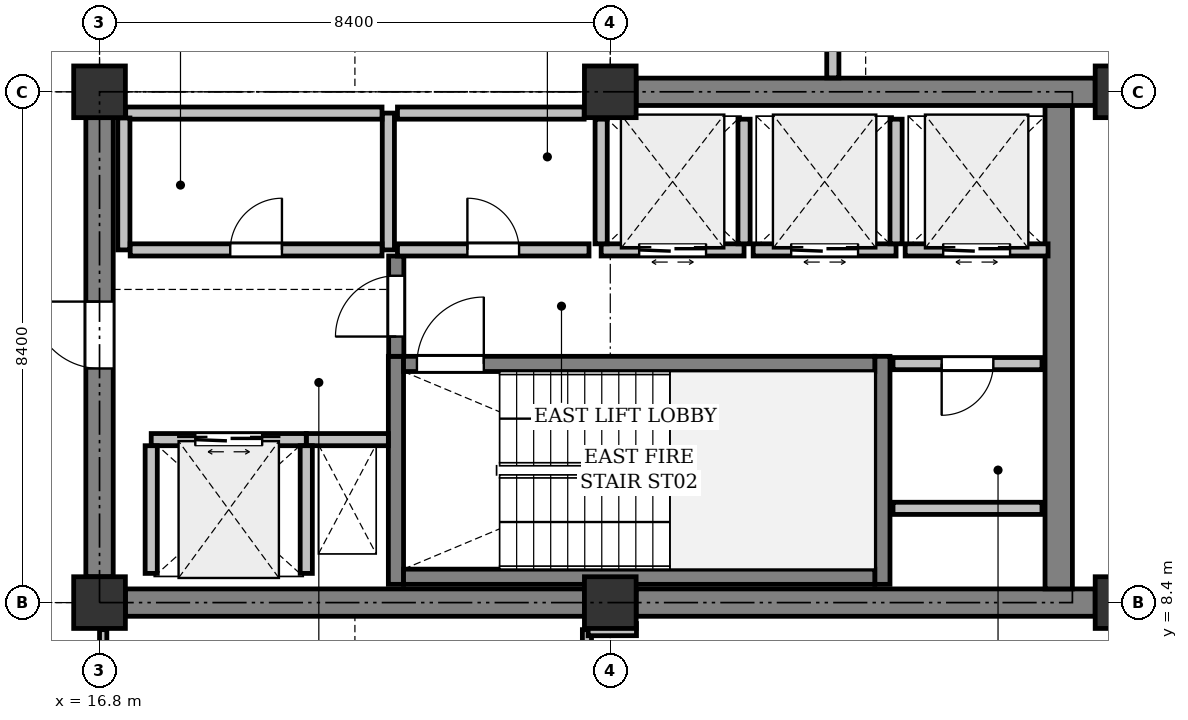
"""IFC4 building model, lengths in metres.
Left out: names, types, materials, properties, quantities, classifications, styles, units other than length and angle.
Written with IfcOpenShell. Run it as: python <this file> out.ifc"""

import sys

from ifc_helpers import new_model, si_unit, direction, frame, frame_2d, origin, origin_2d, place, context, subcontext, project, spatial, rectangle, extrude, element, fill, save


model = new_model("IFC4")
c1 = context("Model", 3, precision=1e-05, world=origin(), true_north=direction((0.0, 1.0)))
c2 = subcontext(c1, "Body", "Model", "MODEL_VIEW")
j1 = project(units=[si_unit("LENGTHUNIT", "METRE"), si_unit("PLANEANGLEUNIT", "RADIAN")], contexts=[c1])
p1 = place(None, origin())
s1 = spatial("IfcSite", under=j1, at=p1, CompositionType="ELEMENT")
p2 = place(p1, origin())
s2 = spatial("IfcBuilding", under=s1, at=p2, CompositionType="ELEMENT")
p3 = place(p2, frame((0.0, 0.0, 314.2)))
s3 = spatial("IfcBuildingStorey", under=s2, at=p3, CompositionType="ELEMENT", Elevation=314.2)
for number, where, z_axis, x_axis in (
    (1, (16.8, 8.4, 0.0), (0.0, 0.0, 1.0), (1.0, 0.0, 0.0)),
    (2, (16.8, 16.8, 0.0), (0.0, 0.0, 1.0), (1.0, 0.0, 0.0)),
    (3, (25.2, 8.4, 0.0), (0.0, 0.0, 1.0), (1.0, 0.0, 0.0)),
    (4, (25.2, 16.8, 0.0), (0.0, 0.0, 1.0), (1.0, 0.0, 0.0)),
    (5, (33.6, 8.4, 0.0), (0.0, 0.0, 1.0), (1.0, 0.0, 0.0)),
    (6, (33.6, 16.8, 0.0), (0.0, 0.0, 1.0), (1.0, 0.0, 0.0)),
):
    element("IfcColumn", number, at=place(p3, frame(where, z_axis=z_axis, x_axis=x_axis)), inside=s3, PredefinedType="COLUMN", context=c2, shape_type="SweptSolid", body=[
        extrude(rectangle(XDim=0.85, YDim=0.85, at=origin_2d()), origin(), (0.0, 0.0, 1.0), 4.0),
    ])
p4 = place(p3, frame((17.225, 8.4, 0.0), z_axis=(0.0, 0.0, 1.0), x_axis=(1.0, 0.0, 0.0)))
e7 = element("IfcWall", 7, at=p4, inside=s3, PredefinedType="SHEAR", context=c2, shape_type="SweptSolid", body=[
    extrude(rectangle(XDim=7.55, YDim=0.45, at=frame_2d((3.775, 0.0))), origin(), (0.0, 0.0, 1.0), 3.725),
])
p5 = place(p3, frame((25.625, 8.4, 0.0), z_axis=(0.0, 0.0, 1.0), x_axis=(1.0, 0.0, 0.0)))
e8 = element("IfcWall", 8, at=p5, inside=s3, PredefinedType="SHEAR", context=c2, shape_type="SweptSolid", body=[
    extrude(rectangle(XDim=7.55, YDim=0.45, at=frame_2d((3.775, 0.0))), origin(), (0.0, 0.0, 1.0), 3.725),
])
p6 = place(p3, frame((32.575, 8.625, 0.0), z_axis=(0.0, 0.0, 1.0), x_axis=(0.0, 1.0, 0.0)))
e9 = element("IfcWall", 9, at=p6, inside=s3, PredefinedType="SHEAR", context=c2, shape_type="SweptSolid", body=[
    extrude(rectangle(XDim=7.95, YDim=0.45, at=frame_2d((3.975, 0.0))), origin(), (0.0, 0.0, 1.0), 3.725),
])
p7 = place(p3, frame((16.8, 8.825, 0.0), z_axis=(0.0, 0.0, 1.0), x_axis=(0.0, 1.0, 0.0)))
e10 = element("IfcWall", 10, at=p7, inside=s3, PredefinedType="SHEAR", context=c2, shape_type="SweptSolid", body=[
    extrude(rectangle(XDim=7.55, YDim=0.45, at=frame_2d((3.775, 0.0))), origin(), (0.0, 0.0, 1.0), 3.725),
])
p8 = place(p7, frame((3.425, 0.0, 0.0)))
e11 = element("IfcOpeningElement", 11, at=p8, cuts=e10, PredefinedType="OPENING", context=c2, shape_type="SweptSolid", body=[
    extrude(rectangle(XDim=1.1, YDim=2.15, at=frame_2d((0.55, 1.075))), frame((0.0, 0.235, 0.0), z_axis=(0.0, -1.0, 0.0), x_axis=(1.0, 0.0, 0.0)), (0.0, 0.0, 1.0), 0.47),
])
p9 = place(p3, frame((25.625, 16.8, 0.0), z_axis=(0.0, 0.0, 1.0), x_axis=(1.0, 0.0, 0.0)))
e12 = element("IfcWall", 12, at=p9, inside=s3, PredefinedType="SHEAR", context=c2, shape_type="SweptSolid", body=[
    extrude(rectangle(XDim=7.55, YDim=0.45, at=frame_2d((3.775, 0.0))), origin(), (0.0, 0.0, 1.0), 3.725),
])
for number, where, z_axis, x_axis in (
    (13, (21.675, 8.7, 0.0), (0.0, 0.0, 1.0), (0.0, 1.0, 0.0)),
    (14, (29.675, 8.7, 0.0), (0.0, 0.0, 1.0), (0.0, 1.0, 0.0)),
):
    element("IfcWall", number, at=place(p3, frame(where, z_axis=z_axis, x_axis=x_axis)), inside=s3, PredefinedType="SHEAR", context=c2, shape_type="SweptSolid", body=[
        extrude(rectangle(XDim=3.75, YDim=0.25, at=frame_2d((1.875, 0.0))), origin(), (0.0, 0.0, 1.0), 3.725),
    ])
p10 = place(p3, frame((21.8, 8.825, 0.0), z_axis=(0.0, 0.0, 1.0), x_axis=(1.0, 0.0, 0.0)))
e15 = element("IfcWall", 15, at=p10, inside=s3, PredefinedType="SHEAR", context=c2, shape_type="SweptSolid", body=[
    extrude(rectangle(XDim=7.75, YDim=0.25, at=frame_2d((3.875, 0.0))), origin(), (0.0, 0.0, 1.0), 3.725),
])
p11 = place(p3, frame((21.8, 12.325, 0.0), z_axis=(0.0, 0.0, 1.0), x_axis=(1.0, 0.0, 0.0)))
e16 = element("IfcWall", 16, at=p11, inside=s3, PredefinedType="SHEAR", context=c2, shape_type="SweptSolid", body=[
    extrude(rectangle(XDim=7.75, YDim=0.25, at=frame_2d((3.875, 0.0))), origin(), (0.0, 0.0, 1.0), 3.725),
])
p12 = place(p11, frame((0.22, 0.0, 0.0)))
e17 = element("IfcOpeningElement", 17, at=p12, cuts=e16, PredefinedType="OPENING", context=c2, shape_type="SweptSolid", body=[
    extrude(rectangle(XDim=1.1, YDim=2.15, at=frame_2d((0.55, 1.075))), frame((0.0, 0.135, 0.0), z_axis=(0.0, -1.0, 0.0), x_axis=(1.0, 0.0, 0.0)), (0.0, 0.0, 1.0), 0.27),
])
p13 = place(p3, frame((20.2, 11.08, 0.0), z_axis=(0.0, 0.0, 1.0), x_axis=(1.0, 0.0, 0.0)))
e18 = element("IfcWall", 18, at=p13, inside=s3, PredefinedType="PARTITIONING", context=c2, shape_type="SweptSolid", body=[
    extrude(rectangle(XDim=1.35, YDim=0.2, at=frame_2d((0.675, 0.0))), origin(), (0.0, 0.0, 1.0), 3.725),
])
p14 = place(p3, frame((21.68, 12.45, 0.0), z_axis=(0.0, 0.0, 1.0), x_axis=(0.0, 1.0, 0.0)))
e19 = element("IfcWall", 19, at=p14, inside=s3, PredefinedType="SHEAR", context=c2, shape_type="SweptSolid", body=[
    extrude(rectangle(XDim=1.65, YDim=0.25, at=frame_2d((0.825, 0.0))), origin(), (0.0, 0.0, 1.0), 3.725),
])
p15 = place(p14, frame((0.325, 0.0, 0.0)))
e20 = element("IfcOpeningElement", 20, at=p15, cuts=e19, PredefinedType="OPENING", context=c2, shape_type="SweptSolid", body=[
    extrude(rectangle(XDim=1.0, YDim=2.15, at=frame_2d((0.5, 1.075))), frame((0.0, 0.135, 0.0), z_axis=(0.0, -1.0, 0.0), x_axis=(1.0, 0.0, 0.0)), (0.0, 0.0, 1.0), 0.27),
])
p16 = place(p3, frame((17.65, 11.08, 0.0), z_axis=(0.0, 0.0, 1.0), x_axis=(1.0, 0.0, 0.0)))
e21 = element("IfcWall", 21, at=p16, inside=s3, PredefinedType="PARTITIONING", context=c2, shape_type="SweptSolid", body=[
    extrude(rectangle(XDim=2.55, YDim=0.2, at=frame_2d((1.275, 0.0))), origin(), (0.0, 0.0, 1.0), 3.725),
])
p17 = place(p16, frame((0.725, 0.0, 0.0)))
e22 = element("IfcOpeningElement", 22, at=p17, cuts=e21, PredefinedType="OPENING", context=c2, shape_type="SweptSolid", body=[
    extrude(rectangle(XDim=1.1, YDim=2.2, at=frame_2d((0.55, 1.1))), frame((0.0, 0.11, 0.0), z_axis=(0.0, -1.0, 0.0), x_axis=(1.0, 0.0, 0.0)), (0.0, 0.0, 1.0), 0.22),
])
for number, where, z_axis, x_axis in (
    (23, (20.2, 8.88, 0.0), (0.0, 0.0, 1.0), (0.0, 1.0, 0.0)),
    (24, (17.65, 8.88, 0.0), (0.0, 0.0, 1.0), (0.0, 1.0, 0.0)),
):
    element("IfcWall", number, at=place(p3, frame(where, z_axis=z_axis, x_axis=x_axis)), inside=s3, PredefinedType="PARTITIONING", context=c2, shape_type="SweptSolid", body=[
        extrude(rectangle(XDim=2.1, YDim=0.2, at=frame_2d((1.05, 0.0))), origin(), (0.0, 0.0, 1.0), 3.725),
    ])
p18 = place(p3, frame((25.05, 14.2, 0.0), z_axis=(0.0, 0.0, 1.0), x_axis=(1.0, 0.0, 0.0)))
e25 = element("IfcWall", 25, at=p18, inside=s3, PredefinedType="PARTITIONING", context=c2, shape_type="SweptSolid", body=[
    extrude(rectangle(XDim=2.35, YDim=0.2, at=frame_2d((1.175, 0.0))), origin(), (0.0, 0.0, 1.0), 3.725),
])
p19 = place(p18, frame((0.625, 0.0, 0.0)))
e26 = element("IfcOpeningElement", 26, at=p19, cuts=e25, PredefinedType="OPENING", context=c2, shape_type="SweptSolid", body=[
    extrude(rectangle(XDim=1.1, YDim=2.2, at=frame_2d((0.55, 1.1))), frame((0.0, 0.11, 0.0), z_axis=(0.0, -1.0, 0.0), x_axis=(1.0, 0.0, 0.0)), (0.0, 0.0, 1.0), 0.22),
])
for number, where, z_axis, x_axis in (
    (27, (27.4, 14.3, 0.0), (0.0, 0.0, 1.0), (0.0, 1.0, 0.0)),
    (28, (25.05, 14.3, 0.0), (0.0, 0.0, 1.0), (0.0, 1.0, 0.0)),
):
    element("IfcWall", number, at=place(p3, frame(where, z_axis=z_axis, x_axis=x_axis)), inside=s3, PredefinedType="PARTITIONING", context=c2, shape_type="SweptSolid", body=[
        extrude(rectangle(XDim=2.05, YDim=0.2, at=frame_2d((1.025, 0.0))), origin(), (0.0, 0.0, 1.0), 3.725),
    ])
p20 = place(p3, frame((27.55, 14.2, 0.0), z_axis=(0.0, 0.0, 1.0), x_axis=(1.0, 0.0, 0.0)))
e29 = element("IfcWall", 29, at=p20, inside=s3, PredefinedType="PARTITIONING", context=c2, shape_type="SweptSolid", body=[
    extrude(rectangle(XDim=2.35, YDim=0.2, at=frame_2d((1.175, 0.0))), origin(), (0.0, 0.0, 1.0), 3.725),
])
p21 = place(p20, frame((0.625, 0.0, 0.0)))
e30 = element("IfcOpeningElement", 30, at=p21, cuts=e29, PredefinedType="OPENING", context=c2, shape_type="SweptSolid", body=[
    extrude(rectangle(XDim=1.1, YDim=2.2, at=frame_2d((0.55, 1.1))), frame((0.0, 0.11, 0.0), z_axis=(0.0, -1.0, 0.0), x_axis=(1.0, 0.0, 0.0)), (0.0, 0.0, 1.0), 0.22),
])
p22 = place(p3, frame((29.9, 14.3, 0.0), z_axis=(0.0, 0.0, 1.0), x_axis=(0.0, 1.0, 0.0)))
e31 = element("IfcWall", 31, at=p22, inside=s3, PredefinedType="PARTITIONING", context=c2, shape_type="SweptSolid", body=[
    extrude(rectangle(XDim=2.05, YDim=0.2, at=frame_2d((1.025, 0.0))), origin(), (0.0, 0.0, 1.0), 3.725),
])
p23 = place(p3, frame((30.05, 14.2, 0.0), z_axis=(0.0, 0.0, 1.0), x_axis=(1.0, 0.0, 0.0)))
e32 = element("IfcWall", 32, at=p23, inside=s3, PredefinedType="PARTITIONING", context=c2, shape_type="SweptSolid", body=[
    extrude(rectangle(XDim=2.35, YDim=0.2, at=frame_2d((1.175, 0.0))), origin(), (0.0, 0.0, 1.0), 3.725),
])
p24 = place(p23, frame((0.625, 0.0, 0.0)))
e33 = element("IfcOpeningElement", 33, at=p24, cuts=e32, PredefinedType="OPENING", context=c2, shape_type="SweptSolid", body=[
    extrude(rectangle(XDim=1.1, YDim=2.2, at=frame_2d((0.55, 1.1))), frame((0.0, 0.11, 0.0), z_axis=(0.0, -1.0, 0.0), x_axis=(1.0, 0.0, 0.0)), (0.0, 0.0, 1.0), 0.22),
])
p25 = place(p3, frame((21.55, 14.2, 0.0), z_axis=(0.0, 0.0, 1.0), x_axis=(0.0, 1.0, 0.0)))
e34 = element("IfcWall", 34, at=p25, inside=s3, PredefinedType="PARTITIONING", context=c2, shape_type="SweptSolid", body=[
    extrude(rectangle(XDim=2.25, YDim=0.2, at=frame_2d((1.125, 0.0))), origin(), (0.0, 0.0, 1.0), 3.725),
])
p26 = place(p3, frame((21.446, 16.45, 0.0), z_axis=(0.0, 0.0, 1.0), x_axis=(-1.0, 0.0, 0.0)))
e35 = element("IfcWall", 35, at=p26, inside=s3, PredefinedType="PARTITIONING", context=c2, shape_type="SweptSolid", body=[
    extrude(rectangle(XDim=4.216, YDim=0.2, at=frame_2d((2.108, 0.0))), origin(), (0.0, 0.0, 1.0), 3.725),
])
p27 = place(p3, frame((17.2, 16.37, 0.0), z_axis=(0.0, 0.0, 1.0), x_axis=(0.0, -1.0, 0.0)))
e36 = element("IfcWall", 36, at=p27, inside=s3, PredefinedType="PARTITIONING", context=c2, shape_type="SweptSolid", body=[
    extrude(rectangle(XDim=2.17, YDim=0.2, at=frame_2d((1.085, 0.0))), origin(), (0.0, 0.0, 1.0), 3.725),
])
p28 = place(p3, frame((17.304, 14.2, 0.0), z_axis=(0.0, 0.0, 1.0), x_axis=(1.0, 0.0, 0.0)))
e37 = element("IfcWall", 37, at=p28, inside=s3, PredefinedType="PARTITIONING", context=c2, shape_type="SweptSolid", body=[
    extrude(rectangle(XDim=4.142, YDim=0.2, at=frame_2d((2.071, 0.0))), origin(), (0.0, 0.0, 1.0), 3.725),
])
p29 = place(p28, frame((1.646, 0.0, 0.0)))
e38 = element("IfcOpeningElement", 38, at=p29, cuts=e37, PredefinedType="OPENING", context=c2, shape_type="SweptSolid", body=[
    extrude(rectangle(XDim=0.85, YDim=2.15, at=frame_2d((0.425, 1.075))), frame((0.0, 0.11, 0.0), z_axis=(0.0, -1.0, 0.0), x_axis=(1.0, 0.0, 0.0)), (0.0, 0.0, 1.0), 0.22),
])
p30 = place(p3, frame((24.77, 16.45, 0.0), z_axis=(0.0, 0.0, 1.0), x_axis=(-1.0, 0.0, 0.0)))
e39 = element("IfcWall", 39, at=p30, inside=s3, PredefinedType="PARTITIONING", context=c2, shape_type="SweptSolid", body=[
    extrude(rectangle(XDim=3.07, YDim=0.2, at=frame_2d((1.535, 0.0))), origin(), (0.0, 0.0, 1.0), 3.725),
])
p31 = place(p3, frame((21.7, 14.2, 0.0), z_axis=(0.0, 0.0, 1.0), x_axis=(1.0, 0.0, 0.0)))
e40 = element("IfcWall", 40, at=p31, inside=s3, PredefinedType="PARTITIONING", context=c2, shape_type="SweptSolid", body=[
    extrude(rectangle(XDim=3.15, YDim=0.2, at=frame_2d((1.575, 0.0))), origin(), (0.0, 0.0, 1.0), 3.725),
])
p32 = place(p31, frame((1.15, 0.0, 0.0)))
e41 = element("IfcOpeningElement", 41, at=p32, cuts=e40, PredefinedType="OPENING", context=c2, shape_type="SweptSolid", body=[
    extrude(rectangle(XDim=0.85, YDim=2.15, at=frame_2d((0.425, 1.075))), frame((0.0, 0.11, 0.0), z_axis=(0.0, -1.0, 0.0), x_axis=(1.0, 0.0, 0.0)), (0.0, 0.0, 1.0), 0.22),
])
p33 = place(p3, frame((32.3, 12.33, 0.0), z_axis=(0.0, 0.0, 1.0), x_axis=(-1.0, 0.0, 0.0)))
e42 = element("IfcWall", 42, at=p33, inside=s3, PredefinedType="PARTITIONING", context=c2, shape_type="SweptSolid", body=[
    extrude(rectangle(XDim=2.45, YDim=0.2, at=frame_2d((1.225, 0.0))), origin(), (0.0, 0.0, 1.0), 3.725),
])
p34 = place(p33, frame((0.8, 0.0, 0.0)))
e43 = element("IfcOpeningElement", 43, at=p34, cuts=e42, PredefinedType="OPENING", context=c2, shape_type="SweptSolid", body=[
    extrude(rectangle(XDim=0.85, YDim=2.15, at=frame_2d((0.425, 1.075))), frame((0.0, 0.11, 0.0), z_axis=(0.0, -1.0, 0.0), x_axis=(1.0, 0.0, 0.0)), (0.0, 0.0, 1.0), 0.22),
])
p35 = place(p3, frame((29.85, 9.95, 0.0), z_axis=(0.0, 0.0, 1.0), x_axis=(1.0, 0.0, 0.0)))
e44 = element("IfcWall", 44, at=p35, inside=s3, PredefinedType="PARTITIONING", context=c2, shape_type="SweptSolid", body=[
    extrude(rectangle(XDim=2.45, YDim=0.2, at=frame_2d((1.225, 0.0))), origin(), (0.0, 0.0, 1.0), 3.725),
])
p36 = place(p3, frame((24.816, 0.124, 0.0), z_axis=(0.0, 0.0, 1.0), x_axis=(0.0, 1.0, 0.0)))
e45 = element("IfcWall", 45, at=p36, inside=s3, PredefinedType="PARTITIONING", context=c2, shape_type="SweptSolid", body=[
    extrude(rectangle(XDim=7.831, YDim=0.15, at=frame_2d((3.916, 0.0))), origin(), (0.0, 0.0, 1.0), 3.725),
])
p37 = place(p3, frame((16.86, 7.955, 0.0), z_axis=(0.0, 0.0, 1.0), x_axis=(0.0, -1.0, 0.0)))
e46 = element("IfcWall", 46, at=p37, inside=s3, PredefinedType="PARTITIONING", context=c2, shape_type="SweptSolid", body=[
    extrude(rectangle(XDim=2.555, YDim=0.12, at=frame_2d((1.278, 0.0))), origin(), (0.0, 0.0, 1.0), 3.319),
])
p38 = place(p3, frame((25.631, 7.956, 0.0), z_axis=(0.0, 0.0, 1.0), x_axis=(-0.999999575533, -0.00092137553, 0.0)))
e47 = element("IfcWall", 47, at=p38, inside=s3, PredefinedType="PARTITIONING", context=c2, shape_type="SweptSolid", body=[
    extrude(rectangle(XDim=0.795, YDim=0.2, at=frame_2d((0.397, 0.0))), origin(), (0.0, 0.0, 1.0), 3.319),
])
p39 = place(p3, frame((28.86, 19.05, 0.0), z_axis=(0.0, 0.0, 1.0), x_axis=(0.0, -1.0, 0.0)))
e48 = element("IfcWall", 48, at=p39, inside=s3, PredefinedType="PARTITIONING", context=c2, shape_type="SweptSolid", body=[
    extrude(rectangle(XDim=2.021, YDim=0.2, at=frame_2d((1.01, 0.0))), origin(), (0.0, 0.0, 1.0), 3.725),
])
p40 = place(p8, origin())
e49 = element("IfcDoor", 49, at=p40, inside=s3, OperationType="SINGLE_SWING_LEFT", PredefinedType="DOOR", context=c2, shape_type="SweptSolid", body=[
    extrude(rectangle(XDim=1.1, YDim=2.15, at=frame_2d((0.55, 1.075))), frame((0.0, 0.025, 0.0), z_axis=(0.0, -1.0, 0.0), x_axis=(1.0, 0.0, 0.0)), (0.0, 0.0, 1.0), 0.05),
])
fill(e11, e49)
p41 = place(p12, origin())
e50 = element("IfcDoor", 50, at=p41, inside=s3, OperationType="SINGLE_SWING_LEFT", PredefinedType="DOOR", context=c2, shape_type="SweptSolid", body=[
    extrude(rectangle(XDim=1.1, YDim=2.15, at=frame_2d((0.55, 1.075))), frame((0.0, 0.025, 0.0), z_axis=(0.0, -1.0, 0.0), x_axis=(1.0, 0.0, 0.0)), (0.0, 0.0, 1.0), 0.05),
])
fill(e17, e50)
p42 = place(p15, origin())
e51 = element("IfcDoor", 51, at=p42, inside=s3, OperationType="SINGLE_SWING_LEFT", PredefinedType="DOOR", context=c2, shape_type="SweptSolid", body=[
    extrude(rectangle(XDim=1.0, YDim=2.15, at=frame_2d((0.5, 1.075))), frame((0.0, 0.025, 0.0), z_axis=(0.0, -1.0, 0.0), x_axis=(1.0, 0.0, 0.0)), (0.0, 0.0, 1.0), 0.05),
])
fill(e20, e51)
p43 = place(p17, origin())
e52 = element("IfcDoor", 52, at=p43, inside=s3, OperationType="DOUBLE_DOOR_SLIDING", PredefinedType="DOOR", context=c2, shape_type="SweptSolid", body=[
    extrude(rectangle(XDim=1.1, YDim=2.2, at=frame_2d((0.55, 1.1))), frame((0.0, 0.025, 0.0), z_axis=(0.0, -1.0, 0.0), x_axis=(1.0, 0.0, 0.0)), (0.0, 0.0, 1.0), 0.05),
])
fill(e22, e52)
p44 = place(p19, origin())
e53 = element("IfcDoor", 53, at=p44, inside=s3, OperationType="DOUBLE_DOOR_SLIDING", PredefinedType="DOOR", context=c2, shape_type="SweptSolid", body=[
    extrude(rectangle(XDim=1.1, YDim=2.2, at=frame_2d((0.55, 1.1))), frame((0.0, 0.025, 0.0), z_axis=(0.0, -1.0, 0.0), x_axis=(1.0, 0.0, 0.0)), (0.0, 0.0, 1.0), 0.05),
])
fill(e26, e53)
p45 = place(p21, origin())
e54 = element("IfcDoor", 54, at=p45, inside=s3, OperationType="DOUBLE_DOOR_SLIDING", PredefinedType="DOOR", context=c2, shape_type="SweptSolid", body=[
    extrude(rectangle(XDim=1.1, YDim=2.2, at=frame_2d((0.55, 1.1))), frame((0.0, 0.025, 0.0), z_axis=(0.0, -1.0, 0.0), x_axis=(1.0, 0.0, 0.0)), (0.0, 0.0, 1.0), 0.05),
])
fill(e30, e54)
p46 = place(p24, origin())
e55 = element("IfcDoor", 55, at=p46, inside=s3, OperationType="DOUBLE_DOOR_SLIDING", PredefinedType="DOOR", context=c2, shape_type="SweptSolid", body=[
    extrude(rectangle(XDim=1.1, YDim=2.2, at=frame_2d((0.55, 1.1))), frame((0.0, 0.025, 0.0), z_axis=(0.0, -1.0, 0.0), x_axis=(1.0, 0.0, 0.0)), (0.0, 0.0, 1.0), 0.05),
])
fill(e33, e55)
p47 = place(p29, origin())
e56 = element("IfcDoor", 56, at=p47, inside=s3, OperationType="SINGLE_SWING_RIGHT", PredefinedType="DOOR", context=c2, shape_type="SweptSolid", body=[
    extrude(rectangle(XDim=0.85, YDim=2.15, at=frame_2d((0.425, 1.075))), frame((0.0, 0.025, 0.0), z_axis=(0.0, -1.0, 0.0), x_axis=(1.0, 0.0, 0.0)), (0.0, 0.0, 1.0), 0.05),
])
fill(e38, e56)
p48 = place(p32, origin())
e57 = element("IfcDoor", 57, at=p48, inside=s3, OperationType="SINGLE_SWING_LEFT", PredefinedType="DOOR", context=c2, shape_type="SweptSolid", body=[
    extrude(rectangle(XDim=0.85, YDim=2.15, at=frame_2d((0.425, 1.075))), frame((0.0, 0.025, 0.0), z_axis=(0.0, -1.0, 0.0), x_axis=(1.0, 0.0, 0.0)), (0.0, 0.0, 1.0), 0.05),
])
fill(e41, e57)
p49 = place(p34, origin())
e58 = element("IfcDoor", 58, at=p49, inside=s3, OperationType="SINGLE_SWING_RIGHT", PredefinedType="DOOR", context=c2, shape_type="SweptSolid", body=[
    extrude(rectangle(XDim=0.85, YDim=2.15, at=frame_2d((0.425, 1.075))), frame((0.0, 0.025, 0.0), z_axis=(0.0, -1.0, 0.0), x_axis=(1.0, 0.0, 0.0)), (0.0, 0.0, 1.0), 0.05),
])
fill(e43, e58)
save(model, sys.argv[1])
